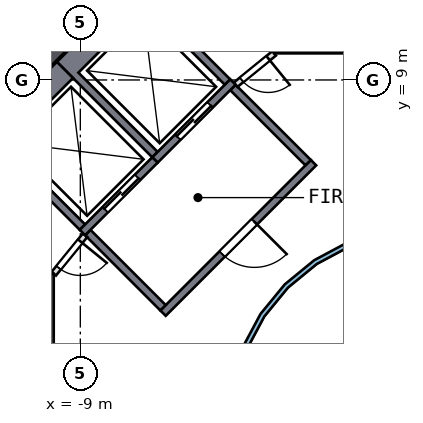
"""IFC4 building model, lengths in metres.
Left out: names, types, materials, properties, quantities, classifications, styles, units other than length and angle.
Written with IfcOpenShell. Run it as: python <this file> out.ifc"""

import sys

from ifc_helpers import new_model, si_unit, direction, frame, frame_2d, origin, place, context, subcontext, project, spatial, polyline, rectangle, outline, extrude, element, fill, save


model = new_model("IFC4")
c1 = context("Model", 3, precision=1e-05, world=origin(), true_north=direction((0.0, 1.0)))
c2 = subcontext(c1, "Body", "Model", "MODEL_VIEW")
j1 = project(units=[si_unit("LENGTHUNIT", "METRE"), si_unit("PLANEANGLEUNIT", "RADIAN")], contexts=[c1])
p1 = place(None, origin())
s1 = spatial("IfcSite", under=j1, at=p1, CompositionType="ELEMENT")
p2 = place(p1, origin())
s2 = spatial("IfcBuilding", under=s1, at=p2, CompositionType="ELEMENT")
p3 = place(p2, frame((0.0, 0.0, 263.0)))
s3 = spatial("IfcBuildingStorey", under=s2, at=p3, CompositionType="ELEMENT", Elevation=263.0)
p4 = place(p3, frame((-5.622, 13.823, 0.0), z_axis=(0.0, 0.0, 1.0), x_axis=(-0.707106781, -0.707106781, 0.0)))
e1 = element("IfcWall", 1, at=p4, inside=s3, PredefinedType="SHEAR", context=c2, shape_type="SweptSolid", body=[
    extrude(rectangle(XDim=11.598, YDim=0.5, at=frame_2d((5.799, 0.0))), origin(), (0.0, 0.0, 1.0), 6.0),
])
p5 = place(p3, origin())
e2 = element("IfcWall", 2, at=p5, inside=s3, PredefinedType="SOLIDWALL", context=c2, shape_type="SweptSolid", body=[
    extrude(outline(polyline([(-3.9, 9.7), (-3.9, 13.5), (-1.2, 13.5), (-1.2, 9.7), (-3.9, 9.7)]), holes=[polyline([(-1.4, 12.9), (-3.7, 12.9), (-3.7, 9.9), (-1.4, 9.9), (-1.4, 12.9)])]), origin(), (0.0, 0.0, 1.0), 5.55),
])
p6 = place(p3, origin())
e3 = element("IfcWall", 3, at=p6, inside=s3, PredefinedType="SOLIDWALL", context=c2, shape_type="SweptSolid", body=[
    extrude(outline(polyline([(-13.5, 1.2), (-13.5, 3.9), (-9.7, 3.9), (-9.7, 1.2), (-13.5, 1.2)]), holes=[polyline([(-9.9, 3.7), (-12.9, 3.7), (-12.9, 1.4), (-9.9, 1.4), (-9.9, 3.7)])]), origin(), (0.0, 0.0, 1.0), 5.55),
])
p7 = place(p3, origin())
e4 = element("IfcWall", 4, at=p7, inside=s3, PredefinedType="SOLIDWALL", context=c2, shape_type="SweptSolid", body=[
    extrude(outline(polyline([(-9.617, 9.475), (-7.566, 11.526), (-5.056, 9.016), (-5.197, 8.874), (-7.283, 10.96), (-9.051, 9.192), (-6.965, 7.106), (-7.106, 6.965), (-9.617, 9.475)])), origin(), (0.0, 0.0, 1.0), 5.55),
])
p8 = place(p3, frame((-4.985, 8.945, 0.0), z_axis=(0.0, 0.0, 1.0), x_axis=(-0.707106781, -0.707106781, 0.0)))
e5 = element("IfcWall", 5, at=p8, inside=s3, PredefinedType="SOLIDWALL", context=c2, shape_type="SweptSolid", body=[
    extrude(rectangle(XDim=2.9, YDim=0.2, at=frame_2d((1.45, 0.0))), origin(), (0.0, 0.0, 1.0), 5.55),
])
p9 = place(p8, frame((0.85, 0.0, 0.0)))
e6 = element("IfcOpeningElement", 6, at=p9, cuts=e5, PredefinedType="OPENING", context=c2, shape_type="SweptSolid", body=[
    extrude(rectangle(XDim=1.2, YDim=2.1, at=frame_2d((0.6, 1.05))), frame((0.0, 0.11, 0.0), z_axis=(0.0, -1.0, 0.0), x_axis=(1.0, 0.0, 0.0)), (0.0, 0.0, 1.0), 0.22),
])
p10 = place(p3, origin())
e7 = element("IfcWall", 7, at=p10, inside=s3, PredefinedType="SOLIDWALL", context=c2, shape_type="SweptSolid", body=[
    extrude(outline(polyline([(-11.526, 7.566), (-9.617, 9.475), (-9.192, 9.051), (-10.96, 7.283), (-8.874, 5.197), (-9.016, 5.056), (-11.526, 7.566)])), origin(), (0.0, 0.0, 1.0), 5.55),
])
p11 = place(p3, frame((-7.036, 6.894, 0.0), z_axis=(0.0, 0.0, 1.0), x_axis=(-0.707106781, -0.707106781, 0.0)))
e8 = element("IfcWall", 8, at=p11, inside=s3, PredefinedType="SOLIDWALL", context=c2, shape_type="SweptSolid", body=[
    extrude(rectangle(XDim=2.7, YDim=0.2, at=frame_2d((1.35, 0.0))), origin(), (0.0, 0.0, 1.0), 5.55),
])
p12 = place(p11, frame((0.65, 0.0, 0.0)))
e9 = element("IfcOpeningElement", 9, at=p12, cuts=e8, PredefinedType="OPENING", context=c2, shape_type="SweptSolid", body=[
    extrude(rectangle(XDim=1.2, YDim=2.1, at=frame_2d((0.6, 1.05))), frame((0.0, 0.11, 0.0), z_axis=(0.0, -1.0, 0.0), x_axis=(1.0, 0.0, 0.0)), (0.0, 0.0, 1.0), 0.22),
])
p13 = place(p3, frame((-2.864, 6.823, 0.0), z_axis=(0.0, 0.0, 1.0), x_axis=(-0.707106781, -0.707106781, 0.0)))
e10 = element("IfcWall", 10, at=p13, inside=s3, PredefinedType="SOLIDWALL", context=c2, shape_type="SweptSolid", body=[
    extrude(rectangle(XDim=5.6, YDim=0.2, at=frame_2d((2.8, 0.0))), origin(), (0.0, 0.0, 1.0), 5.55),
])
p14 = place(p13, frame((2.2, 0.0, 0.0)))
e11 = element("IfcOpeningElement", 11, at=p14, cuts=e10, PredefinedType="OPENING", context=c2, shape_type="SweptSolid", body=[
    extrude(rectangle(XDim=1.2, YDim=2.1, at=frame_2d((0.6, 1.05))), frame((0.0, 0.11, 0.0), z_axis=(0.0, -1.0, 0.0), x_axis=(1.0, 0.0, 0.0)), (0.0, 0.0, 1.0), 0.22),
])
for number, where, z_axis, x_axis in (
    (12, (-3.005, 6.823, 0.0), (0.0, 0.0, 1.0), (-0.707, 0.707, 0.0)),
    (13, (-6.823, 3.005, 0.0), (0.0, 0.0, 1.0), (-0.707, 0.707, 0.0)),
):
    element("IfcWall", number, at=place(p3, frame(where, z_axis=z_axis, x_axis=x_axis)), inside=s3, PredefinedType="SOLIDWALL", context=c2, shape_type="SweptSolid", body=[
        extrude(rectangle(XDim=2.8, YDim=0.2, at=frame_2d((1.4, 0.0))), origin(), (0.0, 0.0, 1.0), 5.55),
    ])
p15 = place(p3, frame((-3.9, 9.7, 0.0), z_axis=(0.0, 0.0, 1.0), x_axis=(-0.775559878, -0.631274009, 0.0)))
e14 = element("IfcWall", 14, at=p15, inside=s3, PredefinedType="PARTITIONING", context=c2, shape_type="SweptSolid", body=[
    extrude(rectangle(XDim=1.308, YDim=0.15, at=frame_2d((0.654, 0.0))), origin(), (0.0, 0.0, 1.0), 5.55),
])
p16 = place(p15, frame((0.204, 0.0, 0.0)))
e15 = element("IfcOpeningElement", 15, at=p16, cuts=e14, PredefinedType="OPENING", context=c2, shape_type="SweptSolid", body=[
    extrude(rectangle(XDim=0.9, YDim=2.1, at=frame_2d((0.45, 1.05))), frame((0.0, 0.085, 0.0), z_axis=(0.0, -1.0, 0.0), x_axis=(1.0, 0.0, 0.0)), (0.0, 0.0, 1.0), 0.17),
])
p17 = place(p3, frame((-8.874, 4.914, 0.0), z_axis=(0.0, 0.0, 1.0), x_axis=(-0.631274009, -0.775559878, 0.0)))
e16 = element("IfcWall", 16, at=p17, inside=s3, PredefinedType="PARTITIONING", context=c2, shape_type="SweptSolid", body=[
    extrude(rectangle(XDim=1.308, YDim=0.15, at=frame_2d((0.654, 0.0))), origin(), (0.0, 0.0, 1.0), 5.55),
])
p18 = place(p17, frame((0.204, 0.0, 0.0)))
e17 = element("IfcOpeningElement", 17, at=p18, cuts=e16, PredefinedType="OPENING", context=c2, shape_type="SweptSolid", body=[
    extrude(rectangle(XDim=0.9, YDim=2.1, at=frame_2d((0.45, 1.05))), frame((0.0, 0.085, 0.0), z_axis=(0.0, -1.0, 0.0), x_axis=(1.0, 0.0, 0.0)), (0.0, 0.0, 1.0), 0.17),
])
p19 = place(p3, origin())
e18 = element("IfcWall", 18, at=p19, inside=s3, PredefinedType="SOLIDWALL", context=c2, shape_type="SweptSolid", body=[
    extrude(outline(polyline([(5.021, -0.999), (4.73, -1.959), (4.257, -2.844), (3.62, -3.62), (2.844, -4.257), (1.959, -4.73), (0.999, -5.021), (0.0, -5.12), (-0.999, -5.021), (-1.959, -4.73), (-2.844, -4.257), (-3.62, -3.62), (-4.257, -2.844), (-4.73, -1.959), (-5.021, -0.999), (-5.12, 0.0), (-5.021, 0.999), (-4.73, 1.959), (-4.257, 2.844), (-3.62, 3.62), (-2.844, 4.257), (-1.959, 4.73), (-0.999, 5.021), (0.0, 5.12), (0.999, 5.021), (1.959, 4.73), (2.844, 4.257), (3.62, 3.62), (4.257, 2.844), (4.73, 1.959), (5.021, 0.999), (5.12, 0.0), (5.021, -0.999)]), holes=[polyline([(4.904, 0.976), (4.619, 1.913), (4.157, 2.778), (3.535, 3.535), (2.778, 4.157), (1.913, 4.619), (0.976, 4.904), (0.0, 5.0), (-0.976, 4.904), (-1.913, 4.619), (-2.778, 4.157), (-3.535, 3.535), (-4.157, 2.778), (-4.619, 1.913), (-4.904, 0.976), (-5.0, 0.0), (-4.904, -0.976), (-4.619, -1.913), (-4.157, -2.778), (-3.535, -3.535), (-2.778, -4.157), (-1.913, -4.619), (-0.976, -4.904), (0.0, -5.0), (0.976, -4.904), (1.913, -4.619), (2.778, -4.157), (3.535, -3.535), (4.157, -2.778), (4.619, -1.913), (4.904, -0.976), (5.0, 0.0), (4.904, 0.976)])]), origin(), (0.0, 0.0, 1.0), 5.55),
])
p20 = place(p9, origin())
e19 = element("IfcDoor", 19, at=p20, inside=s3, OperationType="DOUBLE_DOOR_SLIDING", PredefinedType="DOOR", context=c2, shape_type="SweptSolid", body=[
    extrude(rectangle(XDim=1.2, YDim=2.1, at=frame_2d((0.6, 1.05))), frame((0.0, 0.025, 0.0), z_axis=(0.0, -1.0, 0.0), x_axis=(1.0, 0.0, 0.0)), (0.0, 0.0, 1.0), 0.05),
])
fill(e6, e19)
p21 = place(p12, origin())
e20 = element("IfcDoor", 20, at=p21, inside=s3, OperationType="DOUBLE_DOOR_SLIDING", PredefinedType="DOOR", context=c2, shape_type="SweptSolid", body=[
    extrude(rectangle(XDim=1.2, YDim=2.1, at=frame_2d((0.6, 1.05))), frame((0.0, 0.025, 0.0), z_axis=(0.0, -1.0, 0.0), x_axis=(1.0, 0.0, 0.0)), (0.0, 0.0, 1.0), 0.05),
])
fill(e9, e20)
p22 = place(p14, origin())
e21 = element("IfcDoor", 21, at=p22, inside=s3, OperationType="SINGLE_SWING_LEFT", PredefinedType="DOOR", context=c2, shape_type="SweptSolid", body=[
    extrude(rectangle(XDim=1.2, YDim=2.1, at=frame_2d((0.6, 1.05))), frame((0.0, 0.025, 0.0), z_axis=(0.0, -1.0, 0.0), x_axis=(1.0, 0.0, 0.0)), (0.0, 0.0, 1.0), 0.05),
])
fill(e11, e21)
p23 = place(p16, origin())
e22 = element("IfcDoor", 22, at=p23, inside=s3, OperationType="SINGLE_SWING_LEFT", PredefinedType="DOOR", context=c2, shape_type="SweptSolid", body=[
    extrude(rectangle(XDim=0.9, YDim=2.1, at=frame_2d((0.45, 1.05))), frame((0.0, 0.025, 0.0), z_axis=(0.0, -1.0, 0.0), x_axis=(1.0, 0.0, 0.0)), (0.0, 0.0, 1.0), 0.05),
])
fill(e15, e22)
p24 = place(p18, origin())
e23 = element("IfcDoor", 23, at=p24, inside=s3, OperationType="SINGLE_SWING_LEFT", PredefinedType="DOOR", context=c2, shape_type="SweptSolid", body=[
    extrude(rectangle(XDim=0.9, YDim=2.1, at=frame_2d((0.45, 1.05))), frame((0.0, 0.025, 0.0), z_axis=(0.0, -1.0, 0.0), x_axis=(1.0, 0.0, 0.0)), (0.0, 0.0, 1.0), 0.05),
])
fill(e17, e23)
save(model, sys.argv[1])
